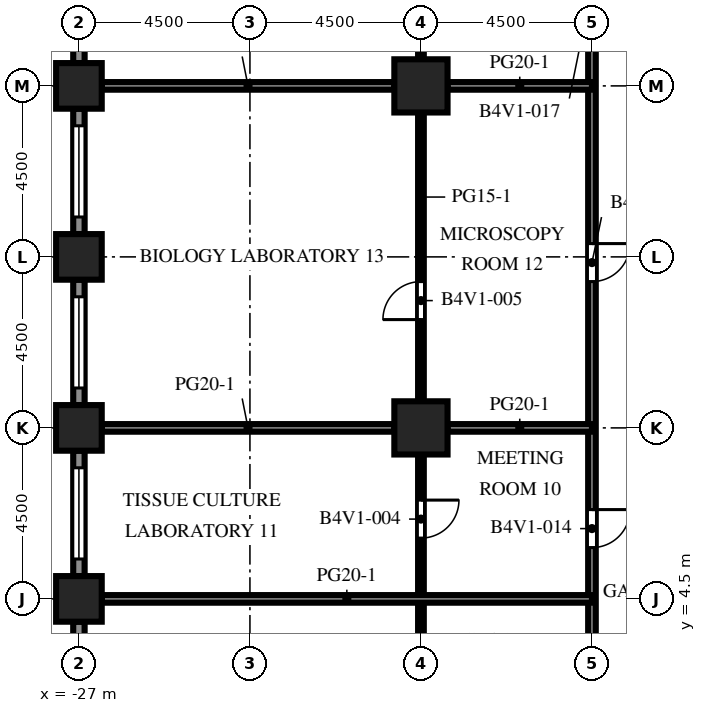
"""IFC4 building model, lengths in metres.
Left out: names, types, materials, properties, quantities, classifications, styles, units other than length and angle.
Written with IfcOpenShell. Run it as: python <this file> out.ifc"""

import sys

from ifc_helpers import new_model, si_unit, direction, frame, frame_2d, origin, origin_2d, place, context, subcontext, project, spatial, rectangle, extrude, element, fill, save


model = new_model("IFC4")
c1 = context("Model", 3, precision=1e-05, world=origin(), true_north=direction((0.0, 1.0)))
c2 = subcontext(c1, "Body", "Model", "MODEL_VIEW")
j1 = project(units=[si_unit("LENGTHUNIT", "METRE"), si_unit("PLANEANGLEUNIT", "RADIAN")], contexts=[c1])
p1 = place(None, origin())
s1 = spatial("IfcSite", under=j1, at=p1, CompositionType="ELEMENT")
p2 = place(p1, origin())
s2 = spatial("IfcBuilding", under=s1, at=p2, CompositionType="ELEMENT")
p3 = place(p2, frame((0.0, 0.0, 124.9)))
s3 = spatial("IfcBuildingStorey", under=s2, at=p3, CompositionType="ELEMENT", Elevation=124.9)
for number, where, z_axis, x_axis in (
    (1, (-27.0, 4.5, 0.0), (0.0, 0.0, 1.0), (1.0, 0.0, 0.0)),
    (2, (-27.0, 9.0, 0.0), (0.0, 0.0, 1.0), (1.0, 0.0, 0.0)),
    (3, (-27.0, 13.5, 0.0), (0.0, 0.0, 1.0), (1.0, 0.0, 0.0)),
    (4, (-27.0, 18.0, 0.0), (0.0, 0.0, 1.0), (1.0, 0.0, 0.0)),
):
    element("IfcColumn", number, at=place(p3, frame(where, z_axis=z_axis, x_axis=x_axis)), inside=s3, PredefinedType="COLUMN", context=c2, shape_type="SweptSolid", body=[
        extrude(rectangle(XDim=1.2, YDim=1.2, at=origin_2d()), origin(), (0.0, 0.0, 1.0), 4.1),
    ])
for number, where, z_axis, x_axis in (
    (5, (-18.0, 9.0, 0.0), (0.0, 0.0, 1.0), (1.0, 0.0, 0.0)),
    (6, (-18.0, 18.0, 0.0), (0.0, 0.0, 1.0), (1.0, 0.0, 0.0)),
):
    element("IfcColumn", number, at=place(p3, frame(where, z_axis=z_axis, x_axis=x_axis)), inside=s3, PredefinedType="COLUMN", context=c2, shape_type="SweptSolid", body=[
        extrude(rectangle(XDim=1.4, YDim=1.4, at=origin_2d()), origin(), (0.0, 0.0, 1.0), 4.1),
    ])
p4 = place(p3, frame((-27.0, 18.6, 0.0), z_axis=(0.0, 0.0, 1.0), x_axis=(0.0, 1.0, 0.0)))
e7 = element("IfcWall", 7, at=p4, inside=s3, PredefinedType="SOLIDWALL", context=c2, shape_type="SweptSolid", body=[
    extrude(rectangle(XDim=3.3, YDim=0.3, at=frame_2d((1.65, 0.0))), origin(), (0.0, 0.0, 1.0), 2.75),
])
p5 = place(p4, frame((1.15, 0.0, 0.0)))
e8 = element("IfcOpeningElement", 8, at=p5, cuts=e7, PredefinedType="OPENING", context=c2, shape_type="SweptSolid", body=[
    extrude(rectangle(XDim=1.0, YDim=2.2, at=frame_2d((0.5, 1.1))), frame((0.0, 0.16, 0.0), z_axis=(0.0, -1.0, 0.0), x_axis=(1.0, 0.0, 0.0)), (0.0, 0.0, 1.0), 0.32),
])
p6 = place(p3, frame((-27.0, 14.1, 0.0), z_axis=(0.0, 0.0, 1.0), x_axis=(0.0, 1.0, 0.0)))
e9 = element("IfcWall", 9, at=p6, inside=s3, PredefinedType="SOLIDWALL", context=c2, shape_type="SweptSolid", body=[
    extrude(rectangle(XDim=3.3, YDim=0.3, at=frame_2d((1.65, 0.0))), origin(), (0.0, 0.0, 1.0), 2.75),
])
p7 = place(p6, frame((0.45, 0.0, 0.8)))
e10 = element("IfcOpeningElement", 10, at=p7, cuts=e9, PredefinedType="OPENING", context=c2, shape_type="SweptSolid", body=[
    extrude(rectangle(XDim=2.4, YDim=1.7, at=frame_2d((1.2, 0.85))), frame((0.0, 0.16, 0.0), z_axis=(0.0, -1.0, 0.0), x_axis=(1.0, 0.0, 0.0)), (0.0, 0.0, 1.0), 0.32),
])
p8 = place(p3, frame((-27.0, 9.6, 0.0), z_axis=(0.0, 0.0, 1.0), x_axis=(0.0, 1.0, 0.0)))
e11 = element("IfcWall", 11, at=p8, inside=s3, PredefinedType="SOLIDWALL", context=c2, shape_type="SweptSolid", body=[
    extrude(rectangle(XDim=3.3, YDim=0.3, at=frame_2d((1.65, 0.0))), origin(), (0.0, 0.0, 1.0), 2.75),
])
p9 = place(p8, frame((0.45, 0.0, 0.8)))
e12 = element("IfcOpeningElement", 12, at=p9, cuts=e11, PredefinedType="OPENING", context=c2, shape_type="SweptSolid", body=[
    extrude(rectangle(XDim=2.4, YDim=1.7, at=frame_2d((1.2, 0.85))), frame((0.0, 0.16, 0.0), z_axis=(0.0, -1.0, 0.0), x_axis=(1.0, 0.0, 0.0)), (0.0, 0.0, 1.0), 0.32),
])
p10 = place(p3, frame((-27.0, 5.1, 0.0), z_axis=(0.0, 0.0, 1.0), x_axis=(0.0, 1.0, 0.0)))
e13 = element("IfcWall", 13, at=p10, inside=s3, PredefinedType="SOLIDWALL", context=c2, shape_type="SweptSolid", body=[
    extrude(rectangle(XDim=3.3, YDim=0.3, at=frame_2d((1.65, 0.0))), origin(), (0.0, 0.0, 1.0), 2.75),
])
p11 = place(p10, frame((0.45, 0.0, 0.8)))
e14 = element("IfcOpeningElement", 14, at=p11, cuts=e13, PredefinedType="OPENING", context=c2, shape_type="SweptSolid", body=[
    extrude(rectangle(XDim=2.4, YDim=1.7, at=frame_2d((1.2, 0.85))), frame((0.0, 0.16, 0.0), z_axis=(0.0, -1.0, 0.0), x_axis=(1.0, 0.0, 0.0)), (0.0, 0.0, 1.0), 0.32),
])
p12 = place(p3, frame((-27.0, 0.6, 0.0), z_axis=(0.0, 0.0, 1.0), x_axis=(0.0, 1.0, 0.0)))
e15 = element("IfcWall", 15, at=p12, inside=s3, PredefinedType="SOLIDWALL", context=c2, shape_type="SweptSolid", body=[
    extrude(rectangle(XDim=3.3, YDim=0.3, at=frame_2d((1.65, 0.0))), origin(), (0.0, 0.0, 1.0), 2.75),
])
p13 = place(p12, frame((0.45, 0.0, 0.8)))
e16 = element("IfcOpeningElement", 16, at=p13, cuts=e15, PredefinedType="OPENING", context=c2, shape_type="SweptSolid", body=[
    extrude(rectangle(XDim=2.4, YDim=1.7, at=frame_2d((1.2, 0.85))), frame((0.0, 0.16, 0.0), z_axis=(0.0, -1.0, 0.0), x_axis=(1.0, 0.0, 0.0)), (0.0, 0.0, 1.0), 0.32),
])
p14 = place(p3, frame((-18.0, 0.7, 0.0), z_axis=(0.0, 0.0, 1.0), x_axis=(0.0, 1.0, 0.0)))
e17 = element("IfcWall", 17, at=p14, inside=s3, PredefinedType="PARTITIONING", context=c2, shape_type="SweptSolid", body=[
    extrude(rectangle(XDim=7.6, YDim=0.15, at=frame_2d((3.8, 0.0))), origin(), (0.0, 0.0, 1.0), 3.65),
])
p15 = place(p14, frame((5.4, 0.0, 0.0)))
e18 = element("IfcOpeningElement", 18, at=p15, cuts=e17, PredefinedType="OPENING", context=c2, shape_type="SweptSolid", body=[
    extrude(rectangle(XDim=1.0, YDim=2.1, at=frame_2d((0.5, 1.05))), frame((0.0, 0.085, 0.0), z_axis=(0.0, -1.0, 0.0), x_axis=(1.0, 0.0, 0.0)), (0.0, 0.0, 1.0), 0.17),
])
p16 = place(p3, frame((-18.0, 9.7, 0.0), z_axis=(0.0, 0.0, 1.0), x_axis=(0.0, 1.0, 0.0)))
e19 = element("IfcWall", 19, at=p16, inside=s3, PredefinedType="PARTITIONING", context=c2, shape_type="SweptSolid", body=[
    extrude(rectangle(XDim=7.6, YDim=0.15, at=frame_2d((3.8, 0.0))), origin(), (0.0, 0.0, 1.0), 3.65),
])
p17 = place(p16, frame((2.15, 0.0, 0.0)))
e20 = element("IfcOpeningElement", 20, at=p17, cuts=e19, PredefinedType="OPENING", context=c2, shape_type="SweptSolid", body=[
    extrude(rectangle(XDim=1.0, YDim=2.1, at=frame_2d((0.5, 1.05))), frame((0.0, 0.085, 0.0), z_axis=(0.0, -1.0, 0.0), x_axis=(1.0, 0.0, 0.0)), (0.0, 0.0, 1.0), 0.17),
])
p18 = place(p3, frame((-18.0, 18.7, 0.0), z_axis=(0.0, 0.0, 1.0), x_axis=(0.0, 1.0, 0.0)))
e21 = element("IfcWall", 21, at=p18, inside=s3, PredefinedType="PARTITIONING", context=c2, shape_type="SweptSolid", body=[
    extrude(rectangle(XDim=3.1, YDim=0.15, at=frame_2d((1.55, 0.0))), origin(), (0.0, 0.0, 1.0), 3.65),
])
p19 = place(p18, frame((0.9, 0.0, 0.0)))
e22 = element("IfcOpeningElement", 22, at=p19, cuts=e21, PredefinedType="OPENING", context=c2, shape_type="SweptSolid", body=[
    extrude(rectangle(XDim=1.0, YDim=2.1, at=frame_2d((0.5, 1.05))), frame((0.0, 0.085, 0.0), z_axis=(0.0, -1.0, 0.0), x_axis=(1.0, 0.0, 0.0)), (0.0, 0.0, 1.0), 0.17),
])
p20 = place(p3, frame((-13.5, -21.9, 0.0), z_axis=(0.0, 0.0, 1.0), x_axis=(0.0, 1.0, 0.0)))
e23 = element("IfcWall", 23, at=p20, inside=s3, PredefinedType="PARTITIONING", context=c2, shape_type="SweptSolid", body=[
    extrude(rectangle(XDim=52.8, YDim=0.2, at=frame_2d((26.4, 0.0))), origin(), (0.0, 0.0, 1.0), 3.65),
])
p21 = place(p20, frame((3.25, 0.0, 0.0)))
e24 = element("IfcOpeningElement", 24, at=p21, cuts=e23, PredefinedType="OPENING", context=c2, shape_type="SweptSolid", body=[
    extrude(rectangle(XDim=1.0, YDim=2.1, at=frame_2d((0.5, 1.05))), frame((0.0, 0.11, 0.0), z_axis=(0.0, -1.0, 0.0), x_axis=(1.0, 0.0, 0.0)), (0.0, 0.0, 1.0), 0.22),
])
p22 = place(p20, frame((10.0, 0.0, 0.0)))
e25 = element("IfcOpeningElement", 25, at=p22, cuts=e23, PredefinedType="OPENING", context=c2, shape_type="SweptSolid", body=[
    extrude(rectangle(XDim=1.0, YDim=2.1, at=frame_2d((0.5, 1.05))), frame((0.0, 0.11, 0.0), z_axis=(0.0, -1.0, 0.0), x_axis=(1.0, 0.0, 0.0)), (0.0, 0.0, 1.0), 0.22),
])
p23 = place(p20, frame((21.0, 0.0, 0.0)))
e26 = element("IfcOpeningElement", 26, at=p23, cuts=e23, PredefinedType="OPENING", context=c2, shape_type="SweptSolid", body=[
    extrude(rectangle(XDim=1.0, YDim=2.1, at=frame_2d((0.5, 1.05))), frame((0.0, 0.11, 0.0), z_axis=(0.0, -1.0, 0.0), x_axis=(1.0, 0.0, 0.0)), (0.0, 0.0, 1.0), 0.22),
])
p24 = place(p20, frame((27.75, 0.0, 0.0)))
e27 = element("IfcOpeningElement", 27, at=p24, cuts=e23, PredefinedType="OPENING", context=c2, shape_type="SweptSolid", body=[
    extrude(rectangle(XDim=1.0, YDim=2.1, at=frame_2d((0.5, 1.05))), frame((0.0, 0.11, 0.0), z_axis=(0.0, -1.0, 0.0), x_axis=(1.0, 0.0, 0.0)), (0.0, 0.0, 1.0), 0.22),
])
p25 = place(p20, frame((34.75, 0.0, 0.0)))
e28 = element("IfcOpeningElement", 28, at=p25, cuts=e23, PredefinedType="OPENING", context=c2, shape_type="SweptSolid", body=[
    extrude(rectangle(XDim=1.0, YDim=2.1, at=frame_2d((0.5, 1.05))), frame((0.0, 0.11, 0.0), z_axis=(0.0, -1.0, 0.0), x_axis=(1.0, 0.0, 0.0)), (0.0, 0.0, 1.0), 0.22),
])
p26 = place(p20, frame((42.0, 0.0, 0.0)))
e29 = element("IfcOpeningElement", 29, at=p26, cuts=e23, PredefinedType="OPENING", context=c2, shape_type="SweptSolid", body=[
    extrude(rectangle(XDim=1.0, YDim=2.1, at=frame_2d((0.5, 1.05))), frame((0.0, 0.11, 0.0), z_axis=(0.0, -1.0, 0.0), x_axis=(1.0, 0.0, 0.0)), (0.0, 0.0, 1.0), 0.22),
])
p27 = place(p20, frame((46.25, 0.0, 0.0)))
e30 = element("IfcOpeningElement", 30, at=p27, cuts=e23, PredefinedType="OPENING", context=c2, shape_type="SweptSolid", body=[
    extrude(rectangle(XDim=1.0, YDim=2.1, at=frame_2d((0.5, 1.05))), frame((0.0, 0.11, 0.0), z_axis=(0.0, -1.0, 0.0), x_axis=(1.0, 0.0, 0.0)), (0.0, 0.0, 1.0), 0.22),
])
p28 = place(p20, frame((51.0, 0.0, 0.0)))
e31 = element("IfcOpeningElement", 31, at=p28, cuts=e23, PredefinedType="OPENING", context=c2, shape_type="SweptSolid", body=[
    extrude(rectangle(XDim=1.0, YDim=2.1, at=frame_2d((0.5, 1.05))), frame((0.0, 0.11, 0.0), z_axis=(0.0, -1.0, 0.0), x_axis=(1.0, 0.0, 0.0)), (0.0, 0.0, 1.0), 0.22),
])
p29 = place(p3, frame((-26.4, 4.5, 0.0), z_axis=(0.0, 0.0, 1.0), x_axis=(1.0, 0.0, 0.0)))
e32 = element("IfcWall", 32, at=p29, inside=s3, PredefinedType="PARTITIONING", context=c2, shape_type="SweptSolid", body=[
    extrude(rectangle(XDim=12.9, YDim=0.2, at=frame_2d((6.45, 0.0))), origin(), (0.0, 0.0, 1.0), 3.65),
])
p30 = place(p3, frame((-26.4, 9.0, 0.0), z_axis=(0.0, 0.0, 1.0), x_axis=(1.0, 0.0, 0.0)))
e33 = element("IfcWall", 33, at=p30, inside=s3, PredefinedType="PARTITIONING", context=c2, shape_type="SweptSolid", body=[
    extrude(rectangle(XDim=7.7, YDim=0.2, at=frame_2d((3.85, 0.0))), origin(), (0.0, 0.0, 1.0), 3.65),
])
p31 = place(p3, frame((-17.3, 9.0, 0.0), z_axis=(0.0, 0.0, 1.0), x_axis=(1.0, 0.0, 0.0)))
e34 = element("IfcWall", 34, at=p31, inside=s3, PredefinedType="PARTITIONING", context=c2, shape_type="SweptSolid", body=[
    extrude(rectangle(XDim=3.8, YDim=0.2, at=frame_2d((1.9, 0.0))), origin(), (0.0, 0.0, 1.0), 3.65),
])
p32 = place(p3, frame((-26.4, 18.0, 0.0), z_axis=(0.0, 0.0, 1.0), x_axis=(1.0, 0.0, 0.0)))
e35 = element("IfcWall", 35, at=p32, inside=s3, PredefinedType="PARTITIONING", context=c2, shape_type="SweptSolid", body=[
    extrude(rectangle(XDim=7.7, YDim=0.2, at=frame_2d((3.85, 0.0))), origin(), (0.0, 0.0, 1.0), 3.65),
])
p33 = place(p3, frame((-17.3, 18.0, 0.0), z_axis=(0.0, 0.0, 1.0), x_axis=(1.0, 0.0, 0.0)))
e36 = element("IfcWall", 36, at=p33, inside=s3, PredefinedType="PARTITIONING", context=c2, shape_type="SweptSolid", body=[
    extrude(rectangle(XDim=3.8, YDim=0.2, at=frame_2d((1.9, 0.0))), origin(), (0.0, 0.0, 1.0), 3.65),
])
p34 = place(p7, origin())
e37 = element("IfcWindow", 37, at=p34, inside=s3, PartitioningType="SINGLE_PANEL", PredefinedType="WINDOW", context=c2, shape_type="SweptSolid", body=[
    extrude(rectangle(XDim=2.4, YDim=1.7, at=frame_2d((1.2, 0.85))), frame((0.0, 0.03, 0.0), z_axis=(0.0, -1.0, 0.0), x_axis=(1.0, 0.0, 0.0)), (0.0, 0.0, 1.0), 0.06),
])
fill(e10, e37)
p35 = place(p9, origin())
e38 = element("IfcWindow", 38, at=p35, inside=s3, PartitioningType="SINGLE_PANEL", PredefinedType="WINDOW", context=c2, shape_type="SweptSolid", body=[
    extrude(rectangle(XDim=2.4, YDim=1.7, at=frame_2d((1.2, 0.85))), frame((0.0, 0.03, 0.0), z_axis=(0.0, -1.0, 0.0), x_axis=(1.0, 0.0, 0.0)), (0.0, 0.0, 1.0), 0.06),
])
fill(e12, e38)
p36 = place(p11, origin())
e39 = element("IfcWindow", 39, at=p36, inside=s3, PartitioningType="SINGLE_PANEL", PredefinedType="WINDOW", context=c2, shape_type="SweptSolid", body=[
    extrude(rectangle(XDim=2.4, YDim=1.7, at=frame_2d((1.2, 0.85))), frame((0.0, 0.03, 0.0), z_axis=(0.0, -1.0, 0.0), x_axis=(1.0, 0.0, 0.0)), (0.0, 0.0, 1.0), 0.06),
])
fill(e14, e39)
p37 = place(p15, origin())
e40 = element("IfcDoor", 40, at=p37, inside=s3, OperationType="SINGLE_SWING_RIGHT", PredefinedType="DOOR", context=c2, shape_type="SweptSolid", body=[
    extrude(rectangle(XDim=1.0, YDim=2.1, at=frame_2d((0.5, 1.05))), frame((0.0, 0.025, 0.0), z_axis=(0.0, -1.0, 0.0), x_axis=(1.0, 0.0, 0.0)), (0.0, 0.0, 1.0), 0.05),
])
fill(e18, e40)
p38 = place(p17, origin())
e41 = element("IfcDoor", 41, at=p38, inside=s3, OperationType="SINGLE_SWING_LEFT", PredefinedType="DOOR", context=c2, shape_type="SweptSolid", body=[
    extrude(rectangle(XDim=1.0, YDim=2.1, at=frame_2d((0.5, 1.05))), frame((0.0, 0.025, 0.0), z_axis=(0.0, -1.0, 0.0), x_axis=(1.0, 0.0, 0.0)), (0.0, 0.0, 1.0), 0.05),
])
fill(e20, e41)
p39 = place(p24, origin())
e42 = element("IfcDoor", 42, at=p39, inside=s3, OperationType="SINGLE_SWING_RIGHT", PredefinedType="DOOR", context=c2, shape_type="SweptSolid", body=[
    extrude(rectangle(XDim=1.0, YDim=2.1, at=frame_2d((0.5, 1.05))), frame((0.0, 0.025, 0.0), z_axis=(0.0, -1.0, 0.0), x_axis=(1.0, 0.0, 0.0)), (0.0, 0.0, 1.0), 0.05),
])
fill(e27, e42)
p40 = place(p25, origin())
e43 = element("IfcDoor", 43, at=p40, inside=s3, OperationType="SINGLE_SWING_RIGHT", PredefinedType="DOOR", context=c2, shape_type="SweptSolid", body=[
    extrude(rectangle(XDim=1.0, YDim=2.1, at=frame_2d((0.5, 1.05))), frame((0.0, 0.025, 0.0), z_axis=(0.0, -1.0, 0.0), x_axis=(1.0, 0.0, 0.0)), (0.0, 0.0, 1.0), 0.05),
])
fill(e28, e43)
save(model, sys.argv[1])
